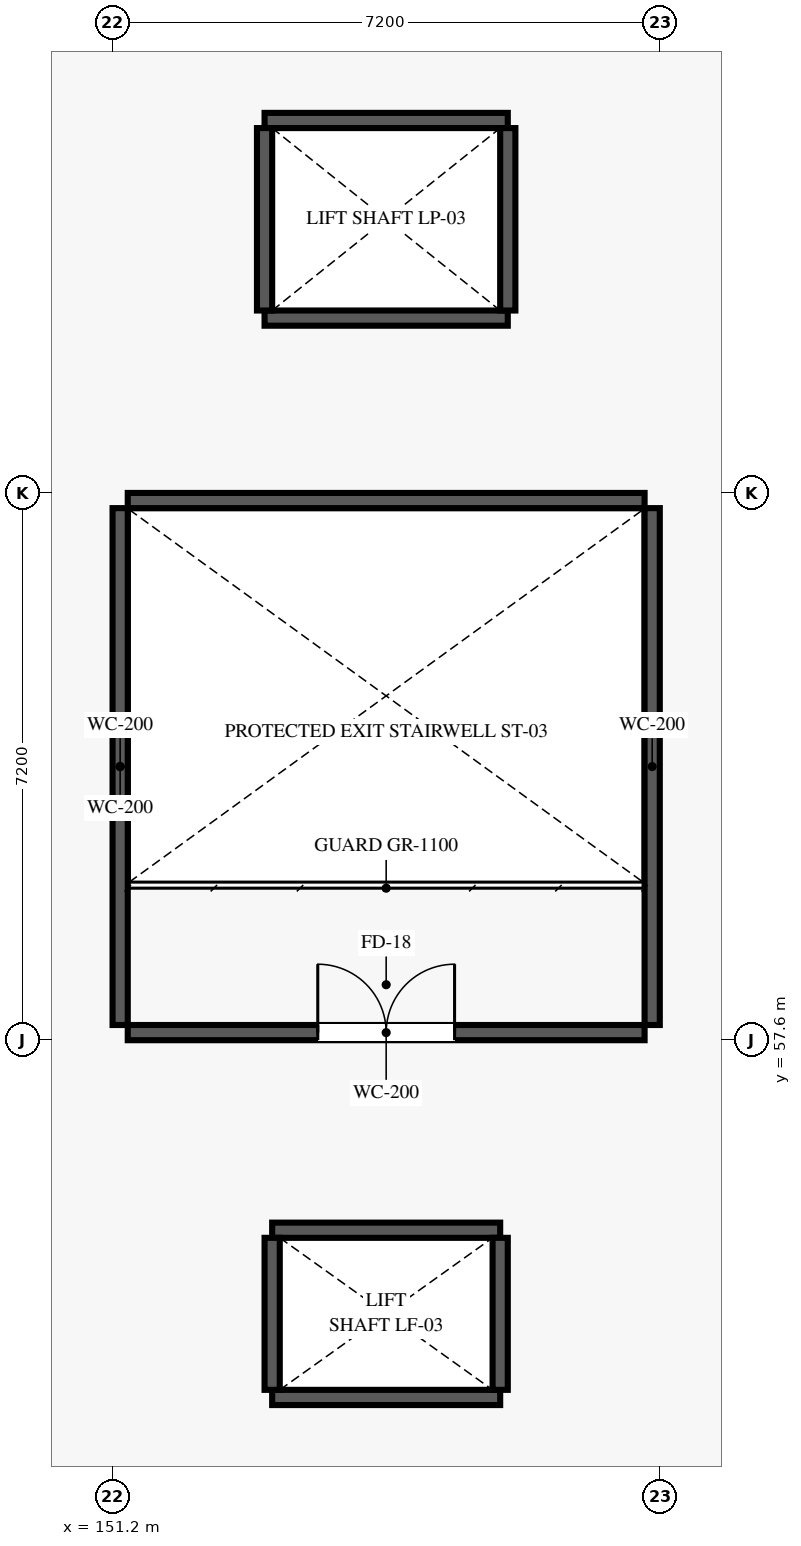
"""IFC4 building model, lengths in metres.
Left out: names, types, materials, properties, quantities, classifications, styles, units other than length and angle.
Written with IfcOpenShell. Run it as: python <this file> out.ifc"""

import sys

from ifc_helpers import new_model, si_unit, direction, frame, frame_2d, origin, place, context, subcontext, project, spatial, rectangle, extrude, element, fill, save


model = new_model("IFC4")
c1 = context("Model", 3, precision=1e-05, world=origin(), true_north=direction((0.0, 1.0)))
c2 = subcontext(c1, "Body", "Model", "MODEL_VIEW")
j1 = project(units=[si_unit("LENGTHUNIT", "METRE"), si_unit("PLANEANGLEUNIT", "RADIAN")], contexts=[c1])
p1 = place(None, origin())
s1 = spatial("IfcSite", under=j1, at=p1, CompositionType="ELEMENT")
p2 = place(p1, origin())
s2 = spatial("IfcBuilding", under=s1, at=p2, CompositionType="ELEMENT")
p3 = place(p2, frame((0.0, 0.0, 29.7)))
s3 = spatial("IfcBuildingStorey", under=s2, at=p3, CompositionType="ELEMENT", Elevation=29.7)
p4 = place(p3, frame((151.4, 57.7, 0.0), z_axis=(0.0, 0.0, 1.0), x_axis=(1.0, 0.0, 0.0)))
e1 = element("IfcWall", 1, at=p4, inside=s3, PredefinedType="SHEAR", context=c2, shape_type="SweptSolid", body=[
    extrude(rectangle(XDim=6.8, YDim=0.2, at=frame_2d((3.4, 0.0))), origin(), (0.0, 0.0, 1.0), 3.83),
])
p5 = place(p4, frame((2.5, 0.0, 0.0)))
e2 = element("IfcOpeningElement", 2, at=p5, cuts=e1, PredefinedType="OPENING", context=c2, shape_type="SweptSolid", body=[
    extrude(rectangle(XDim=1.8, YDim=2.2, at=frame_2d((0.9, 1.1))), frame((0.0, 0.11, 0.0), z_axis=(0.0, -1.0, 0.0), x_axis=(1.0, 0.0, 0.0)), (0.0, 0.0, 1.0), 0.22),
])
for number, where, z_axis, x_axis in (
    (3, (151.4, 64.7, 0.0), (0.0, 0.0, 1.0), (1.0, 0.0, 0.0)),
    (4, (151.3, 57.8, 0.0), (0.0, 0.0, 1.0), (0.0, 1.0, 0.0)),
    (5, (158.3, 57.8, 0.0), (0.0, 0.0, 1.0), (0.0, 1.0, 0.0)),
):
    element("IfcWall", number, at=place(p3, frame(where, z_axis=z_axis, x_axis=x_axis)), inside=s3, PredefinedType="SHEAR", context=c2, shape_type="SweptSolid", body=[
        extrude(rectangle(XDim=6.8, YDim=0.2, at=frame_2d((3.4, 0.0))), origin(), (0.0, 0.0, 1.0), 3.83),
    ])
for number, where, z_axis, x_axis in (
    (6, (153.3, 52.9, 0.0), (0.0, 0.0, 1.0), (1.0, 0.0, 0.0)),
    (7, (153.3, 55.1, 0.0), (0.0, 0.0, 1.0), (1.0, 0.0, 0.0)),
):
    element("IfcWall", number, at=place(p3, frame(where, z_axis=z_axis, x_axis=x_axis)), inside=s3, PredefinedType="SHEAR", context=c2, shape_type="SweptSolid", body=[
        extrude(rectangle(XDim=3.0, YDim=0.2, at=frame_2d((1.5, 0.0))), origin(), (0.0, 0.0, 1.0), 3.83),
    ])
for number, where, z_axis, x_axis in (
    (8, (153.3, 53.0, 0.0), (0.0, 0.0, 1.0), (0.0, 1.0, 0.0)),
    (9, (156.3, 53.0, 0.0), (0.0, 0.0, 1.0), (0.0, 1.0, 0.0)),
):
    element("IfcWall", number, at=place(p3, frame(where, z_axis=z_axis, x_axis=x_axis)), inside=s3, PredefinedType="SHEAR", context=c2, shape_type="SweptSolid", body=[
        extrude(rectangle(XDim=2.0, YDim=0.2, at=frame_2d((1.0, 0.0))), origin(), (0.0, 0.0, 1.0), 3.83),
    ])
for number, where, z_axis, x_axis in (
    (10, (153.2, 67.1, 0.0), (0.0, 0.0, 1.0), (1.0, 0.0, 0.0)),
    (11, (153.2, 69.7, 0.0), (0.0, 0.0, 1.0), (1.0, 0.0, 0.0)),
):
    element("IfcWall", number, at=place(p3, frame(where, z_axis=z_axis, x_axis=x_axis)), inside=s3, PredefinedType="SHEAR", context=c2, shape_type="SweptSolid", body=[
        extrude(rectangle(XDim=3.2, YDim=0.2, at=frame_2d((1.6, 0.0))), origin(), (0.0, 0.0, 1.0), 3.83),
    ])
for number, where, z_axis, x_axis in (
    (12, (153.2, 67.2, 0.0), (0.0, 0.0, 1.0), (0.0, 1.0, 0.0)),
    (13, (156.4, 67.2, 0.0), (0.0, 0.0, 1.0), (0.0, 1.0, 0.0)),
):
    element("IfcWall", number, at=place(p3, frame(where, z_axis=z_axis, x_axis=x_axis)), inside=s3, PredefinedType="SHEAR", context=c2, shape_type="SweptSolid", body=[
        extrude(rectangle(XDim=2.4, YDim=0.2, at=frame_2d((1.2, 0.0))), origin(), (0.0, 0.0, 1.0), 3.83),
    ])
p6 = place(p5, origin())
e14 = element("IfcDoor", 14, at=p6, inside=s3, OperationType="DOUBLE_DOOR_SINGLE_SWING", PredefinedType="DOOR", context=c2, shape_type="SweptSolid", body=[
    extrude(rectangle(XDim=1.8, YDim=2.2, at=frame_2d((0.9, 1.1))), frame((0.0, 0.025, 0.0), z_axis=(0.0, -1.0, 0.0), x_axis=(1.0, 0.0, 0.0)), (0.0, 0.0, 1.0), 0.05),
])
fill(e2, e14)
save(model, sys.argv[1])
